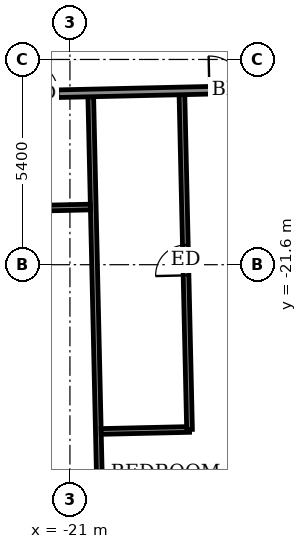
"""IFC4 building model, lengths in metres.
Left out: names, types, materials, properties, quantities, classifications, styles, units other than length and angle.
Written with IfcOpenShell. Run it as: python <this file> out.ifc"""

import sys

from ifc_helpers import new_model, si_unit, direction, frame, frame_2d, origin, place, context, subcontext, project, spatial, rectangle, extrude, element, fill, save


model = new_model("IFC4")
c1 = context("Model", 3, precision=1e-05, world=origin(), true_north=direction((0.0, 1.0)))
c2 = subcontext(c1, "Body", "Model", "MODEL_VIEW")
j1 = project(units=[si_unit("LENGTHUNIT", "METRE"), si_unit("PLANEANGLEUNIT", "RADIAN")], contexts=[c1])
p1 = place(None, origin())
s1 = spatial("IfcSite", under=j1, at=p1, CompositionType="ELEMENT")
p2 = place(p1, origin())
s2 = spatial("IfcBuilding", under=s1, at=p2, CompositionType="ELEMENT")
p3 = place(p2, frame((0.0, 0.0, 44.9)))
s3 = spatial("IfcBuildingStorey", under=s2, at=p3, CompositionType="ELEMENT", Elevation=44.9)
p4 = place(p3, frame((-20.171, -29.579, 0.0), z_axis=(0.0, 0.0, 1.0), x_axis=(-0.022661029756, 0.999743205894, 0.0)))
e1 = element("IfcWall", 1, at=p4, inside=s3, PredefinedType="PARTITIONING", context=c2, shape_type="SweptSolid", body=[
    extrude(rectangle(XDim=12.4, YDim=0.15, at=frame_2d((6.2, 0.0))), origin(), (0.0, 0.0, 1.0), 3.05),
])
p5 = place(p3, frame((-20.178, -25.988, 0.0), z_axis=(0.0, 0.0, 1.0), x_axis=(0.999740478815, 0.022781023197, 0.0)))
e2 = element("IfcWall", 2, at=p5, inside=s3, PredefinedType="PARTITIONING", context=c2, shape_type="SweptSolid", body=[
    extrude(rectangle(XDim=2.325, YDim=0.15, at=frame_2d((1.163, 0.0))), origin(), (0.0, 0.0, 1.0), 3.05),
])
p6 = place(p3, frame((-17.853, -25.935, 0.0), z_axis=(0.0, 0.0, 1.0), x_axis=(-0.022694967989, 0.999742436044, 0.0)))
e3 = element("IfcWall", 3, at=p6, inside=s3, PredefinedType="PARTITIONING", context=c2, shape_type="SweptSolid", body=[
    extrude(rectangle(XDim=8.81, YDim=0.15, at=frame_2d((4.405, 0.0))), origin(), (0.0, 0.0, 1.0), 3.05),
])
p7 = place(p6, frame((4.055, 0.0, 0.0)))
e4 = element("IfcOpeningElement", 4, at=p7, cuts=e3, PredefinedType="OPENING", context=c2, shape_type="SweptSolid", body=[
    extrude(rectangle(XDim=0.8, YDim=2.1, at=frame_2d((0.4, 1.05))), frame((0.0, 0.085, 0.0), z_axis=(0.0, -1.0, 0.0), x_axis=(1.0, 0.0, 0.0)), (0.0, 0.0, 1.0), 0.17),
])
p8 = place(p3, frame((-22.986, -20.14, 0.0), z_axis=(0.0, 0.0, 1.0), x_axis=(0.999746160391, 0.022530308093, 0.0)))
e5 = element("IfcWall", 5, at=p8, inside=s3, PredefinedType="PARTITIONING", context=c2, shape_type="SweptSolid", body=[
    extrude(rectangle(XDim=2.525, YDim=0.15, at=frame_2d((1.262, 0.0))), origin(), (0.0, 0.0, 1.0), 3.05),
])
p9 = place(p3, frame((-30.652, -17.313, 0.0), z_axis=(0.0, 0.0, 1.0), x_axis=(0.999742623764, 0.02268669719, 0.0)))
e6 = element("IfcWall", 6, at=p9, inside=s3, PredefinedType="PARTITIONING", context=c2, shape_type="SweptSolid", body=[
    extrude(rectangle(XDim=58.8, YDim=0.2, at=frame_2d((29.4, 0.0))), origin(), (0.0, 0.0, 1.0), 3.05),
])
p10 = place(p9, frame((2.6, 0.0, 0.0)))
e7 = element("IfcOpeningElement", 7, at=p10, cuts=e6, PredefinedType="OPENING", context=c2, shape_type="SweptSolid", body=[
    extrude(rectangle(XDim=1.0, YDim=2.1, at=frame_2d((0.5, 1.05))), frame((0.0, 0.11, 0.0), z_axis=(0.0, -1.0, 0.0), x_axis=(1.0, 0.0, 0.0)), (0.0, 0.0, 1.0), 0.22),
])
p11 = place(p9, frame((8.45, 0.0, 0.0)))
e8 = element("IfcOpeningElement", 8, at=p11, cuts=e6, PredefinedType="OPENING", context=c2, shape_type="SweptSolid", body=[
    extrude(rectangle(XDim=0.9, YDim=2.1, at=frame_2d((0.45, 1.05))), frame((0.0, 0.11, 0.0), z_axis=(0.0, -1.0, 0.0), x_axis=(1.0, 0.0, 0.0)), (0.0, 0.0, 1.0), 0.22),
])
p12 = place(p9, frame((13.325, 0.0, 0.0)))
e9 = element("IfcOpeningElement", 9, at=p12, cuts=e6, PredefinedType="OPENING", context=c2, shape_type="SweptSolid", body=[
    extrude(rectangle(XDim=0.9, YDim=2.1, at=frame_2d((0.45, 1.05))), frame((0.0, 0.11, 0.0), z_axis=(0.0, -1.0, 0.0), x_axis=(1.0, 0.0, 0.0)), (0.0, 0.0, 1.0), 0.22),
])
p13 = place(p9, frame((15.7, 0.0, 0.0)))
e10 = element("IfcOpeningElement", 10, at=p13, cuts=e6, PredefinedType="OPENING", context=c2, shape_type="SweptSolid", body=[
    extrude(rectangle(XDim=0.9, YDim=2.1, at=frame_2d((0.45, 1.05))), frame((0.0, 0.11, 0.0), z_axis=(0.0, -1.0, 0.0), x_axis=(1.0, 0.0, 0.0)), (0.0, 0.0, 1.0), 0.22),
])
p14 = place(p9, frame((22.725, 0.0, 0.0)))
e11 = element("IfcOpeningElement", 11, at=p14, cuts=e6, PredefinedType="OPENING", context=c2, shape_type="SweptSolid", body=[
    extrude(rectangle(XDim=0.9, YDim=2.1, at=frame_2d((0.45, 1.05))), frame((0.0, 0.11, 0.0), z_axis=(0.0, -1.0, 0.0), x_axis=(1.0, 0.0, 0.0)), (0.0, 0.0, 1.0), 0.22),
])
p15 = place(p9, frame((24.875, 0.0, 0.0)))
e12 = element("IfcOpeningElement", 12, at=p15, cuts=e6, PredefinedType="OPENING", context=c2, shape_type="SweptSolid", body=[
    extrude(rectangle(XDim=0.9, YDim=2.1, at=frame_2d((0.45, 1.05))), frame((0.0, 0.11, 0.0), z_axis=(0.0, -1.0, 0.0), x_axis=(1.0, 0.0, 0.0)), (0.0, 0.0, 1.0), 0.22),
])
p16 = place(p9, frame((31.825, 0.0, 0.0)))
e13 = element("IfcOpeningElement", 13, at=p16, cuts=e6, PredefinedType="OPENING", context=c2, shape_type="SweptSolid", body=[
    extrude(rectangle(XDim=0.9, YDim=2.1, at=frame_2d((0.45, 1.05))), frame((0.0, 0.11, 0.0), z_axis=(0.0, -1.0, 0.0), x_axis=(1.0, 0.0, 0.0)), (0.0, 0.0, 1.0), 0.22),
])
p17 = place(p9, frame((34.025, 0.0, 0.0)))
e14 = element("IfcOpeningElement", 14, at=p17, cuts=e6, PredefinedType="OPENING", context=c2, shape_type="SweptSolid", body=[
    extrude(rectangle(XDim=0.9, YDim=2.1, at=frame_2d((0.45, 1.05))), frame((0.0, 0.11, 0.0), z_axis=(0.0, -1.0, 0.0), x_axis=(1.0, 0.0, 0.0)), (0.0, 0.0, 1.0), 0.22),
])
p18 = place(p9, frame((41.325, 0.0, 0.0)))
e15 = element("IfcOpeningElement", 15, at=p18, cuts=e6, PredefinedType="OPENING", context=c2, shape_type="SweptSolid", body=[
    extrude(rectangle(XDim=0.9, YDim=2.1, at=frame_2d((0.45, 1.05))), frame((0.0, 0.11, 0.0), z_axis=(0.0, -1.0, 0.0), x_axis=(1.0, 0.0, 0.0)), (0.0, 0.0, 1.0), 0.22),
])
p19 = place(p9, frame((43.7, 0.0, 0.0)))
e16 = element("IfcOpeningElement", 16, at=p19, cuts=e6, PredefinedType="OPENING", context=c2, shape_type="SweptSolid", body=[
    extrude(rectangle(XDim=0.9, YDim=2.1, at=frame_2d((0.45, 1.05))), frame((0.0, 0.11, 0.0), z_axis=(0.0, -1.0, 0.0), x_axis=(1.0, 0.0, 0.0)), (0.0, 0.0, 1.0), 0.22),
])
p20 = place(p9, frame((50.65, 0.0, 0.0)))
e17 = element("IfcOpeningElement", 17, at=p20, cuts=e6, PredefinedType="OPENING", context=c2, shape_type="SweptSolid", body=[
    extrude(rectangle(XDim=0.9, YDim=2.1, at=frame_2d((0.45, 1.05))), frame((0.0, 0.11, 0.0), z_axis=(0.0, -1.0, 0.0), x_axis=(1.0, 0.0, 0.0)), (0.0, 0.0, 1.0), 0.22),
])
p21 = place(p9, frame((55.304, 0.0, 0.0)))
e18 = element("IfcOpeningElement", 18, at=p21, cuts=e6, PredefinedType="OPENING", context=c2, shape_type="SweptSolid", body=[
    extrude(rectangle(XDim=1.0, YDim=2.1, at=frame_2d((0.5, 1.05))), frame((0.0, 0.11, 0.0), z_axis=(0.0, -1.0, 0.0), x_axis=(1.0, 0.0, 0.0)), (0.0, 0.0, 1.0), 0.22),
])
p22 = place(p11, origin())
e19 = element("IfcDoor", 19, at=p22, inside=s3, OperationType="SINGLE_SWING_LEFT", PredefinedType="DOOR", context=c2, shape_type="SweptSolid", body=[
    extrude(rectangle(XDim=0.9, YDim=2.1, at=frame_2d((0.45, 1.05))), frame((0.0, 0.025, 0.0), z_axis=(0.0, -1.0, 0.0), x_axis=(1.0, 0.0, 0.0)), (0.0, 0.0, 1.0), 0.05),
])
fill(e8, e19)
p23 = place(p12, origin())
e20 = element("IfcDoor", 20, at=p23, inside=s3, OperationType="SINGLE_SWING_LEFT", PredefinedType="DOOR", context=c2, shape_type="SweptSolid", body=[
    extrude(rectangle(XDim=0.9, YDim=2.1, at=frame_2d((0.45, 1.05))), frame((0.0, 0.025, 0.0), z_axis=(0.0, -1.0, 0.0), x_axis=(1.0, 0.0, 0.0)), (0.0, 0.0, 1.0), 0.05),
])
fill(e9, e20)
p24 = place(p7, origin())
e21 = element("IfcDoor", 21, at=p24, inside=s3, OperationType="SINGLE_SWING_LEFT", PredefinedType="DOOR", context=c2, shape_type="SweptSolid", body=[
    extrude(rectangle(XDim=0.8, YDim=2.1, at=frame_2d((0.4, 1.05))), frame((0.0, 0.025, 0.0), z_axis=(0.0, -1.0, 0.0), x_axis=(1.0, 0.0, 0.0)), (0.0, 0.0, 1.0), 0.05),
])
fill(e4, e21)
save(model, sys.argv[1])
